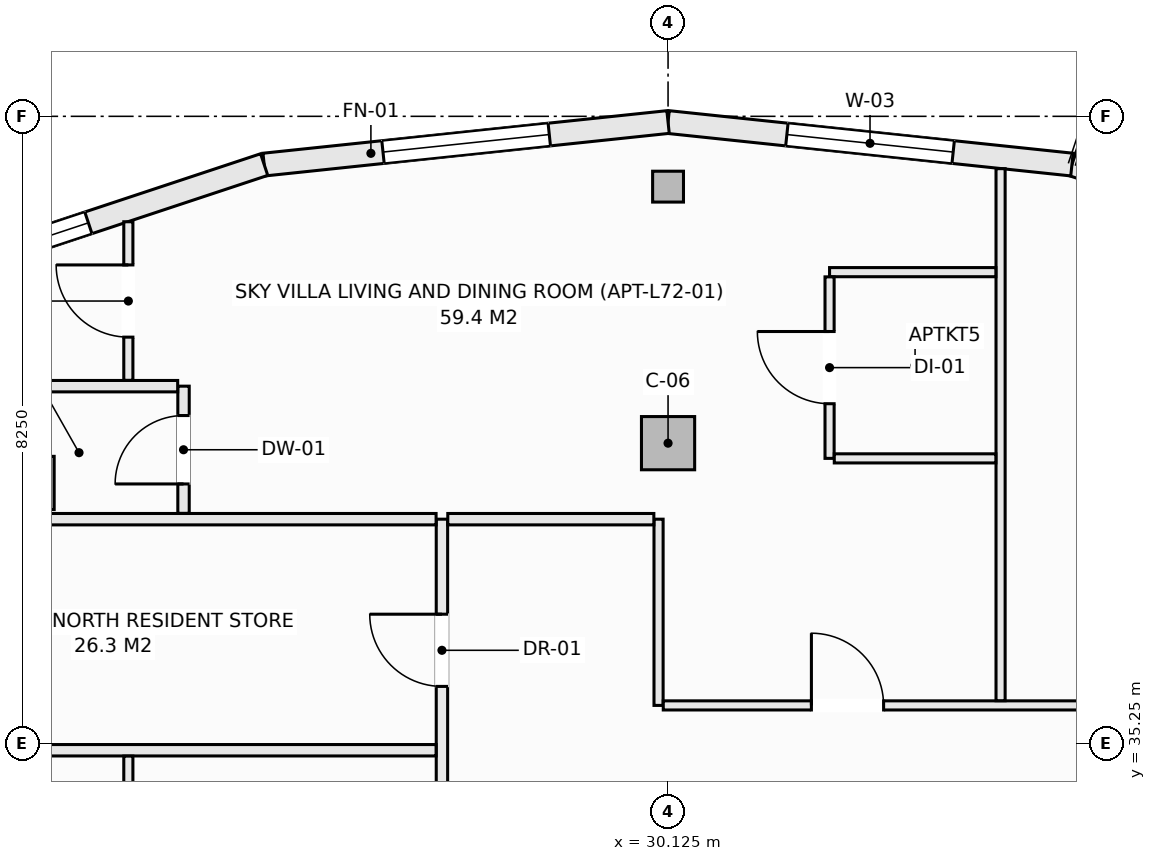
"""IFC4 building model, lengths in metres.
Left out: names, types, materials, properties, quantities, classifications, styles, units other than length and angle.
Written with IfcOpenShell. Run it as: python <this file> out.ifc"""

import sys

from ifc_helpers import new_model, si_unit, direction, frame, frame_2d, origin, origin_2d, place, context, subcontext, project, spatial, rectangle, hollow_rectangle, extrude, element, fill, save


model = new_model("IFC4")
c1 = context("Model", 3, precision=1e-05, world=origin(), true_north=direction((0.0, 1.0)))
c2 = subcontext(c1, "Body", "Model", "MODEL_VIEW")
j1 = project(units=[si_unit("LENGTHUNIT", "METRE"), si_unit("PLANEANGLEUNIT", "RADIAN")], contexts=[c1])
p1 = place(None, origin())
s1 = spatial("IfcSite", under=j1, at=p1, CompositionType="ELEMENT")
p2 = place(p1, origin())
s2 = spatial("IfcBuilding", under=s1, at=p2, CompositionType="ELEMENT")
p3 = place(p2, frame((0.0, 0.0, 265.7)))
s3 = spatial("IfcBuildingStorey", under=s2, at=p3, CompositionType="ELEMENT", Elevation=265.7)
p4 = place(p3, frame((30.125, 42.575, -0.27), z_axis=(0.0, 0.0, 1.0), x_axis=(1.0, 0.0, 0.0)))
e1 = element("IfcColumn", 1, at=p4, inside=s3, PredefinedType="COLUMN", context=c2, shape_type="SweptSolid", body=[
    extrude(hollow_rectangle(XDim=0.406, YDim=0.406, WallThickness=0.016, at=origin_2d()), origin(), (0.0, 0.0, 1.0), 3.3),
])
for number, where, z_axis, x_axis in (
    (2, (30.125, 39.2, -0.27), (0.0, 0.0, 1.0), (1.0, 0.0, 0.0)),
    (3, (21.698, 38.677, -0.27), (0.0, 0.0, 1.0), (1.0, 0.0, 0.0)),
):
    element("IfcColumn", number, at=place(p3, frame(where, z_axis=z_axis, x_axis=x_axis)), inside=s3, PredefinedType="COLUMN", context=c2, shape_type="SweptSolid", body=[
        extrude(rectangle(XDim=0.7, YDim=0.7, at=origin_2d()), origin(), (0.0, 0.0, 1.0), 3.3),
    ])
p5 = place(p3, frame((35.439, 42.865, 0.0), z_axis=(0.0, 0.0, 1.0), x_axis=(0.949252744709, -0.314514271001, 0.0)))
e4 = element("IfcWall", 4, at=p5, inside=s3, PredefinedType="SOLIDWALL", context=c2, shape_type="SweptSolid", body=[
    extrude(rectangle(XDim=5.216, YDim=0.3, at=frame_2d((2.608, 0.0))), origin(), (0.0, 0.0, 1.0), 2.605),
])
p6 = place(p5, frame((1.508, 0.0, 0.72)))
e5 = element("IfcOpeningElement", 5, at=p6, cuts=e4, PredefinedType="OPENING", context=c2, shape_type="SweptSolid", body=[
    extrude(rectangle(XDim=2.2, YDim=1.65, at=frame_2d((1.1, 0.825))), frame((0.0, 0.16, 0.0), z_axis=(0.0, -1.0, 0.0), x_axis=(1.0, 0.0, 0.0)), (0.0, 0.0, 1.0), 0.32),
])
p7 = place(p3, frame((30.125, 43.425, 0.0), z_axis=(0.0, 0.0, 1.0), x_axis=(0.9944966869, -0.104768028258, 0.0)))
e6 = element("IfcWall", 6, at=p7, inside=s3, PredefinedType="SOLIDWALL", context=c2, shape_type="SweptSolid", body=[
    extrude(rectangle(XDim=5.343, YDim=0.3, at=frame_2d((2.672, 0.0))), origin(), (0.0, 0.0, 1.0), 2.605),
])
p8 = place(p7, frame((1.572, 0.0, 0.72)))
e7 = element("IfcOpeningElement", 7, at=p8, cuts=e6, PredefinedType="OPENING", context=c2, shape_type="SweptSolid", body=[
    extrude(rectangle(XDim=2.2, YDim=1.65, at=frame_2d((1.1, 0.825))), frame((0.0, 0.16, 0.0), z_axis=(0.0, -1.0, 0.0), x_axis=(1.0, 0.0, 0.0)), (0.0, 0.0, 1.0), 0.32),
])
p9 = place(p3, frame((24.811, 42.865, 0.0), z_axis=(0.0, 0.0, 1.0), x_axis=(0.9944966869, 0.104768028258, 0.0)))
e8 = element("IfcWall", 8, at=p9, inside=s3, PredefinedType="SOLIDWALL", context=c2, shape_type="SweptSolid", body=[
    extrude(rectangle(XDim=5.343, YDim=0.3, at=frame_2d((2.672, 0.0))), origin(), (0.0, 0.0, 1.0), 2.605),
])
p10 = place(p9, frame((1.572, 0.0, 0.72)))
e9 = element("IfcOpeningElement", 9, at=p10, cuts=e8, PredefinedType="OPENING", context=c2, shape_type="SweptSolid", body=[
    extrude(rectangle(XDim=2.2, YDim=1.65, at=frame_2d((1.1, 0.825))), frame((0.0, 0.16, 0.0), z_axis=(0.0, -1.0, 0.0), x_axis=(1.0, 0.0, 0.0)), (0.0, 0.0, 1.0), 0.32),
])
p11 = place(p3, frame((19.859, 41.225, 0.0), z_axis=(0.0, 0.0, 1.0), x_axis=(0.949252744709, 0.314514271001, 0.0)))
e10 = element("IfcWall", 10, at=p11, inside=s3, PredefinedType="SOLIDWALL", context=c2, shape_type="SweptSolid", body=[
    extrude(rectangle(XDim=5.216, YDim=0.3, at=frame_2d((2.608, 0.0))), origin(), (0.0, 0.0, 1.0), 2.605),
])
p12 = place(p11, frame((1.58, 0.0, 0.72)))
e11 = element("IfcOpeningElement", 11, at=p12, cuts=e10, PredefinedType="OPENING", context=c2, shape_type="SweptSolid", body=[
    extrude(rectangle(XDim=1.2, YDim=1.65, at=frame_2d((0.6, 0.825))), frame((0.0, 0.16, 0.0), z_axis=(0.0, -1.0, 0.0), x_axis=(1.0, 0.0, 0.0)), (0.0, 0.0, 1.0), 0.32),
])
p13 = place(p3, frame((27.15, 34.002, 0.0), z_axis=(0.0, 0.0, 1.0), x_axis=(0.0, 1.0, 0.0)))
e12 = element("IfcWall", 12, at=p13, inside=s3, PredefinedType="PARTITIONING", context=c2, shape_type="SweptSolid", body=[
    extrude(rectangle(XDim=4.198, YDim=0.15, at=frame_2d((2.099, 0.0))), origin(), (0.0, 0.0, 1.0), 3.03),
])
p14 = place(p13, frame((1.998, 0.0, 0.0)))
e13 = element("IfcOpeningElement", 13, at=p14, cuts=e12, PredefinedType="OPENING", context=c2, shape_type="SweptSolid", body=[
    extrude(rectangle(XDim=0.95, YDim=2.1, at=frame_2d((0.475, 1.05))), frame((0.0, 0.085, 0.0), z_axis=(0.0, -1.0, 0.0), x_axis=(1.0, 0.0, 0.0)), (0.0, 0.0, 1.0), 0.17),
])
p15 = place(p3, frame((30.0, 35.75, 0.0), z_axis=(0.0, 0.0, 1.0), x_axis=(0.0, 1.0, 0.0)))
e14 = element("IfcWall", 14, at=p15, inside=s3, PredefinedType="PARTITIONING", context=c2, shape_type="SweptSolid", body=[
    extrude(rectangle(XDim=2.45, YDim=0.12, at=frame_2d((1.225, 0.0))), origin(), (0.0, 0.0, 1.0), 3.03),
])
p16 = place(p3, frame((18.5, 35.16, 0.0), z_axis=(0.0, 0.0, 1.0), x_axis=(1.0, 0.0, 0.0)))
e15 = element("IfcWall", 15, at=p16, inside=s3, PredefinedType="PARTITIONING", context=c2, shape_type="SweptSolid", body=[
    extrude(rectangle(XDim=8.573, YDim=0.15, at=frame_2d((4.287, 0.0))), origin(), (0.0, 0.0, 1.0), 3.03),
])
p17 = place(p3, frame((18.577, 38.2, 0.0), z_axis=(0.0, 0.0, 1.0), x_axis=(1.0, 0.0, 0.0)))
e16 = element("IfcWall", 16, at=p17, inside=s3, PredefinedType="PARTITIONING", context=c2, shape_type="SweptSolid", body=[
    extrude(rectangle(XDim=8.496, YDim=0.15, at=frame_2d((4.248, 0.0))), origin(), (0.0, 0.0, 1.0), 3.03),
])
p18 = place(p3, frame((27.227, 38.2, 0.0), z_axis=(0.0, 0.0, 1.0), x_axis=(1.0, 0.0, 0.0)))
e17 = element("IfcWall", 17, at=p18, inside=s3, PredefinedType="PARTITIONING", context=c2, shape_type="SweptSolid", body=[
    extrude(rectangle(XDim=2.711, YDim=0.15, at=frame_2d((1.355, 0.0))), origin(), (0.0, 0.0, 1.0), 3.03),
])
p19 = place(p3, frame((30.062, 35.75, 0.0), z_axis=(0.0, 0.0, 1.0), x_axis=(1.0, 0.0, 0.0)))
e18 = element("IfcWall", 18, at=p19, inside=s3, PredefinedType="PARTITIONING", context=c2, shape_type="SweptSolid", body=[
    extrude(rectangle(XDim=8.988, YDim=0.12, at=frame_2d((4.494, 0.0))), origin(), (0.0, 0.0, 1.0), 2.478),
])
p20 = place(p19, frame((5.473, 0.0, 0.0)))
e19 = element("IfcOpeningElement", 19, at=p20, cuts=e18, PredefinedType="OPENING", context=c2, shape_type="SweptSolid", body=[
    extrude(rectangle(XDim=0.95, YDim=2.1, at=frame_2d((0.475, 1.05))), frame((0.0, 0.07, 0.0), z_axis=(0.0, -1.0, 0.0), x_axis=(1.0, 0.0, 0.0)), (0.0, 0.0, 1.0), 0.14),
])
p21 = place(p19, frame((1.949, 0.0, 0.0)))
e20 = element("IfcOpeningElement", 20, at=p21, cuts=e18, PredefinedType="OPENING", context=c2, shape_type="SweptSolid", body=[
    extrude(rectangle(XDim=0.95, YDim=2.1, at=frame_2d((0.475, 1.05))), frame((0.0, 0.07, 0.0), z_axis=(0.0, -1.0, 0.0), x_axis=(1.0, 0.0, 0.0)), (0.0, 0.0, 1.0), 0.14),
])
p22 = place(p3, frame((34.5, 35.812, 0.0), z_axis=(0.0, 0.0, 1.0), x_axis=(0.0, 1.0, 0.0)))
e21 = element("IfcWall", 21, at=p22, inside=s3, PredefinedType="PARTITIONING", context=c2, shape_type="SweptSolid", body=[
    extrude(rectangle(XDim=6.999, YDim=0.12, at=frame_2d((3.5, 0.0))), origin(), (0.0, 0.0, 1.0), 2.77),
])
p23 = place(p3, frame((32.25, 41.45, 0.0), z_axis=(0.0, 0.0, 1.0), x_axis=(1.0, 0.0, 0.0)))
e22 = element("IfcWall", 22, at=p23, inside=s3, PredefinedType="PARTITIONING", context=c2, shape_type="SweptSolid", body=[
    extrude(rectangle(XDim=2.188, YDim=0.12, at=frame_2d((1.094, 0.0))), origin(), (0.0, 0.0, 1.0), 3.03),
])
p24 = place(p3, frame((32.25, 39.0, 0.0), z_axis=(0.0, 0.0, 1.0), x_axis=(0.0, 1.0, 0.0)))
e23 = element("IfcWall", 23, at=p24, inside=s3, PredefinedType="PARTITIONING", context=c2, shape_type="SweptSolid", body=[
    extrude(rectangle(XDim=2.388, YDim=0.12, at=frame_2d((1.194, 0.0))), origin(), (0.0, 0.0, 1.0), 3.03),
])
p25 = place(p24, frame((0.719, 0.0, 0.0)))
e24 = element("IfcOpeningElement", 24, at=p25, cuts=e23, PredefinedType="OPENING", context=c2, shape_type="SweptSolid", body=[
    extrude(rectangle(XDim=0.95, YDim=2.1, at=frame_2d((0.475, 1.05))), frame((0.0, 0.07, 0.0), z_axis=(0.0, -1.0, 0.0), x_axis=(1.0, 0.0, 0.0)), (0.0, 0.0, 1.0), 0.14),
])
p26 = place(p3, frame((32.312, 39.0, 0.0), z_axis=(0.0, 0.0, 1.0), x_axis=(1.0, 0.0, 0.0)))
e25 = element("IfcWall", 25, at=p26, inside=s3, PredefinedType="PARTITIONING", context=c2, shape_type="SweptSolid", body=[
    extrude(rectangle(XDim=2.126, YDim=0.12, at=frame_2d((1.063, 0.0))), origin(), (0.0, 0.0, 1.0), 3.03),
])
p27 = place(p3, frame((23.75, 38.277, 0.0), z_axis=(0.0, 0.0, 1.0), x_axis=(0.0, 1.0, 0.0)))
e26 = element("IfcWall", 26, at=p27, inside=s3, PredefinedType="PARTITIONING", context=c2, shape_type="SweptSolid", body=[
    extrude(rectangle(XDim=1.673, YDim=0.15, at=frame_2d((0.836, 0.0))), origin(), (0.0, 0.0, 1.0), 3.03),
])
p28 = place(p27, frame((0.386, 0.0, 0.0)))
e27 = element("IfcOpeningElement", 27, at=p28, cuts=e26, PredefinedType="OPENING", context=c2, shape_type="SweptSolid", body=[
    extrude(rectangle(XDim=0.9, YDim=2.1, at=frame_2d((0.45, 1.05))), frame((0.0, 0.085, 0.0), z_axis=(0.0, -1.0, 0.0), x_axis=(1.0, 0.0, 0.0)), (0.0, 0.0, 1.0), 0.17),
])
p29 = place(p3, frame((21.0, 39.95, 0.0), z_axis=(0.0, 0.0, 1.0), x_axis=(1.0, 0.0, 0.0)))
e28 = element("IfcWall", 28, at=p29, inside=s3, PredefinedType="PARTITIONING", context=c2, shape_type="SweptSolid", body=[
    extrude(rectangle(XDim=2.673, YDim=0.15, at=frame_2d((1.336, 0.0))), origin(), (0.0, 0.0, 1.0), 3.03),
])
p30 = place(p3, frame((23.024, 34.002, 0.0), z_axis=(0.0, 0.0, 1.0), x_axis=(0.0, 1.0, 0.0)))
e29 = element("IfcWall", 29, at=p30, inside=s3, PredefinedType="PARTITIONING", context=c2, shape_type="SweptSolid", body=[
    extrude(rectangle(XDim=1.081, YDim=0.12, at=frame_2d((0.541, 0.0))), origin(), (0.0, 0.0, 1.0), 3.03),
])
p31 = place(p3, frame((23.024, 40.027, 0.0), z_axis=(0.0, 0.0, 1.0), x_axis=(0.0, 1.0, 0.0)))
e30 = element("IfcWall", 30, at=p31, inside=s3, PredefinedType="PARTITIONING", context=c2, shape_type="SweptSolid", body=[
    extrude(rectangle(XDim=2.086, YDim=0.12, at=frame_2d((1.043, 0.0))), origin(), (0.0, 0.0, 1.0), 3.03),
])
p32 = place(p31, frame((0.568, 0.0, 0.0)))
e31 = element("IfcOpeningElement", 31, at=p32, cuts=e30, PredefinedType="OPENING", context=c2, shape_type="SweptSolid", body=[
    extrude(rectangle(XDim=0.95, YDim=2.1, at=frame_2d((0.475, 1.05))), frame((0.0, 0.07, 0.0), z_axis=(0.0, -1.0, 0.0), x_axis=(1.0, 0.0, 0.0)), (0.0, 0.0, 1.0), 0.14),
])
p33 = place(p8, origin())
e32 = element("IfcWindow", 32, at=p33, inside=s3, PartitioningType="SINGLE_PANEL", PredefinedType="WINDOW", context=c2, shape_type="SweptSolid", body=[
    extrude(rectangle(XDim=2.2, YDim=1.65, at=frame_2d((1.1, 0.825))), frame((0.0, 0.03, 0.0), z_axis=(0.0, -1.0, 0.0), x_axis=(1.0, 0.0, 0.0)), (0.0, 0.0, 1.0), 0.06),
])
fill(e7, e32)
p34 = place(p10, origin())
e33 = element("IfcWindow", 33, at=p34, inside=s3, PartitioningType="SINGLE_PANEL", PredefinedType="WINDOW", context=c2, shape_type="SweptSolid", body=[
    extrude(rectangle(XDim=2.2, YDim=1.65, at=frame_2d((1.1, 0.825))), frame((0.0, 0.03, 0.0), z_axis=(0.0, -1.0, 0.0), x_axis=(1.0, 0.0, 0.0)), (0.0, 0.0, 1.0), 0.06),
])
fill(e9, e33)
p35 = place(p12, origin())
e34 = element("IfcWindow", 34, at=p35, inside=s3, PartitioningType="SINGLE_PANEL", PredefinedType="WINDOW", context=c2, shape_type="SweptSolid", body=[
    extrude(rectangle(XDim=1.2, YDim=1.65, at=frame_2d((0.6, 0.825))), frame((0.0, 0.03, 0.0), z_axis=(0.0, -1.0, 0.0), x_axis=(1.0, 0.0, 0.0)), (0.0, 0.0, 1.0), 0.06),
])
fill(e11, e34)
p36 = place(p14, origin())
e35 = element("IfcDoor", 35, at=p36, inside=s3, OperationType="SINGLE_SWING_RIGHT", PredefinedType="DOOR", context=c2, shape_type="SweptSolid", body=[
    extrude(rectangle(XDim=0.95, YDim=2.1, at=frame_2d((0.475, 1.05))), frame((0.0, 0.025, 0.0), z_axis=(0.0, -1.0, 0.0), x_axis=(1.0, 0.0, 0.0)), (0.0, 0.0, 1.0), 0.05),
])
fill(e13, e35)
p37 = place(p21, origin())
e36 = element("IfcDoor", 36, at=p37, inside=s3, OperationType="SINGLE_SWING_LEFT", PredefinedType="DOOR", context=c2, shape_type="SweptSolid", body=[
    extrude(rectangle(XDim=0.95, YDim=2.1, at=frame_2d((0.475, 1.05))), frame((0.0, 0.025, 0.0), z_axis=(0.0, -1.0, 0.0), x_axis=(1.0, 0.0, 0.0)), (0.0, 0.0, 1.0), 0.05),
])
fill(e20, e36)
p38 = place(p25, origin())
e37 = element("IfcDoor", 37, at=p38, inside=s3, OperationType="SINGLE_SWING_RIGHT", PredefinedType="DOOR", context=c2, shape_type="SweptSolid", body=[
    extrude(rectangle(XDim=0.95, YDim=2.1, at=frame_2d((0.475, 1.05))), frame((0.0, 0.025, 0.0), z_axis=(0.0, -1.0, 0.0), x_axis=(1.0, 0.0, 0.0)), (0.0, 0.0, 1.0), 0.05),
])
fill(e24, e37)
p39 = place(p28, origin())
e38 = element("IfcDoor", 38, at=p39, inside=s3, OperationType="SINGLE_SWING_LEFT", PredefinedType="DOOR", context=c2, shape_type="SweptSolid", body=[
    extrude(rectangle(XDim=0.9, YDim=2.1, at=frame_2d((0.45, 1.05))), frame((0.0, 0.025, 0.0), z_axis=(0.0, -1.0, 0.0), x_axis=(1.0, 0.0, 0.0)), (0.0, 0.0, 1.0), 0.05),
])
fill(e27, e38)
p40 = place(p32, origin())
e39 = element("IfcDoor", 39, at=p40, inside=s3, OperationType="SINGLE_SWING_RIGHT", PredefinedType="DOOR", context=c2, shape_type="SweptSolid", body=[
    extrude(rectangle(XDim=0.95, YDim=2.1, at=frame_2d((0.475, 1.05))), frame((0.0, 0.025, 0.0), z_axis=(0.0, -1.0, 0.0), x_axis=(1.0, 0.0, 0.0)), (0.0, 0.0, 1.0), 0.05),
])
fill(e31, e39)
save(model, sys.argv[1])
